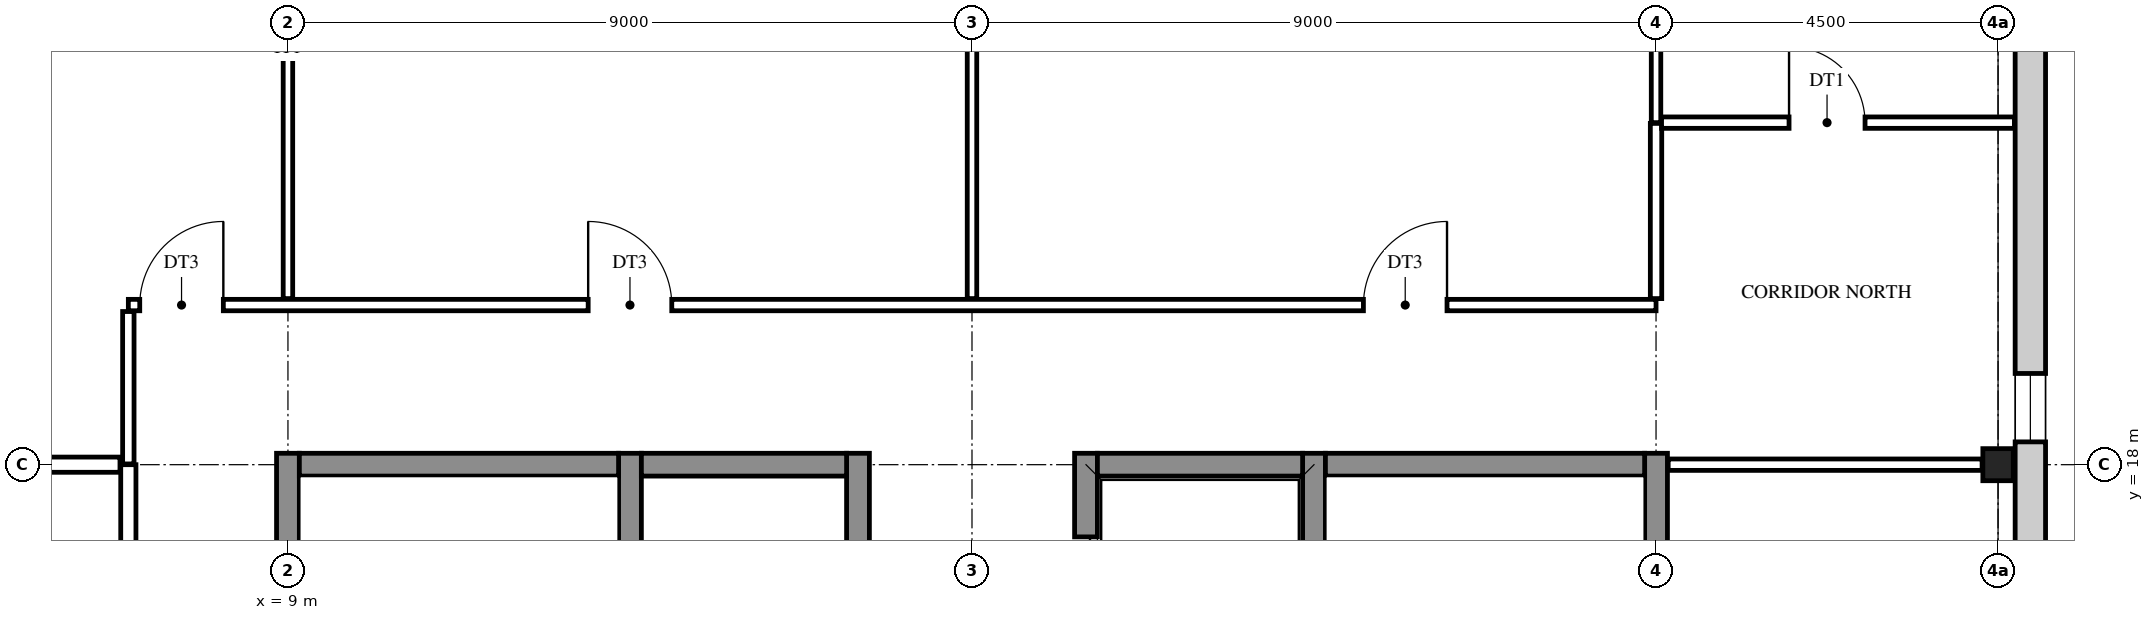
"""IFC4 building model, lengths in metres.
Left out: names, types, materials, properties, quantities, classifications, styles, units other than length and angle.
Written with IfcOpenShell. Run it as: python <this file> out.ifc"""

import sys

from ifc_helpers import new_model, si_unit, direction, frame, frame_2d, origin, origin_2d, place, context, subcontext, project, spatial, rectangle, i_section, extrude, element, fill, save


model = new_model("IFC4")
c1 = context("Model", 3, precision=1e-05, world=origin(), true_north=direction((0.0, 1.0)))
c2 = subcontext(c1, "Body", "Model", "MODEL_VIEW")
j1 = project(units=[si_unit("LENGTHUNIT", "METRE"), si_unit("PLANEANGLEUNIT", "RADIAN")], contexts=[c1])
p1 = place(None, origin())
s1 = spatial("IfcSite", under=j1, at=p1, CompositionType="ELEMENT")
p2 = place(p1, origin())
s2 = spatial("IfcBuilding", under=s1, at=p2, CompositionType="ELEMENT")
p3 = place(p2, frame((0.0, 0.0, 19.2)))
s3 = spatial("IfcBuildingStorey", under=s2, at=p3, CompositionType="ELEMENT", Elevation=19.2)
p4 = place(p3, frame((31.5, 18.0, 0.0), z_axis=(0.0, 0.0, 1.0), x_axis=(1.0, 0.0, 0.0)))
e1 = element("IfcColumn", 1, at=p4, inside=s3, PredefinedType="COLUMN", context=c2, shape_type="SweptSolid", body=[
    extrude(i_section(OverallWidth=0.4, OverallDepth=0.422, WebThickness=0.028, FlangeThickness=0.036, at=origin_2d()), origin(), (0.0, 0.0, 1.0), 4.2),
])
for number, where, z_axis, x_axis in (
    (2, (9.0, 8.85, 0.0), (0.0, 0.0, 1.0), (0.0, 1.0, 0.0)),
    (3, (13.5, 8.85, 0.0), (0.0, 0.0, 1.0), (0.0, 1.0, 0.0)),
):
    element("IfcWall", number, at=place(p3, frame(where, z_axis=z_axis, x_axis=x_axis)), inside=s3, PredefinedType="SHEAR", context=c2, shape_type="SweptSolid", body=[
        extrude(rectangle(XDim=9.3, YDim=0.3, at=frame_2d((4.65, 0.0))), origin(), (0.0, 0.0, 1.0), 4.2),
    ])
p5 = place(p3, frame((16.5, 8.85, 0.0), z_axis=(0.0, 0.0, 1.0), x_axis=(0.0, 1.0, 0.0)))
e4 = element("IfcWall", 4, at=p5, inside=s3, PredefinedType="SHEAR", context=c2, shape_type="SweptSolid", body=[
    extrude(rectangle(XDim=9.3, YDim=0.3, at=frame_2d((4.65, 0.0))), origin(), (0.0, 0.0, 1.0), 4.2),
])
p6 = place(p5, frame((1.1, 0.0, 0.0)))
e5 = element("IfcOpeningElement", 5, at=p6, cuts=e4, PredefinedType="OPENING", context=c2, shape_type="SweptSolid", body=[
    extrude(rectangle(XDim=1.1, YDim=2.1, at=frame_2d((0.55, 1.05))), frame((0.0, 0.16, 0.0), z_axis=(0.0, -1.0, 0.0), x_axis=(1.0, 0.0, 0.0)), (0.0, 0.0, 1.0), 0.32),
])
p7 = place(p5, frame((4.1, 0.0, 0.0)))
e6 = element("IfcOpeningElement", 6, at=p7, cuts=e4, PredefinedType="OPENING", context=c2, shape_type="SweptSolid", body=[
    extrude(rectangle(XDim=1.1, YDim=2.1, at=frame_2d((0.55, 1.05))), frame((0.0, 0.16, 0.0), z_axis=(0.0, -1.0, 0.0), x_axis=(1.0, 0.0, 0.0)), (0.0, 0.0, 1.0), 0.32),
])
p8 = place(p3, frame((19.5, 8.85, 0.0), z_axis=(0.0, 0.0, 1.0), x_axis=(0.0, 1.0, 0.0)))
e7 = element("IfcWall", 7, at=p8, inside=s3, PredefinedType="SHEAR", context=c2, shape_type="SweptSolid", body=[
    extrude(rectangle(XDim=9.3, YDim=0.3, at=frame_2d((4.65, 0.0))), origin(), (0.0, 0.0, 1.0), 4.2),
])
p9 = place(p8, frame((3.95, 0.0, 0.0)))
e8 = element("IfcOpeningElement", 8, at=p9, cuts=e7, PredefinedType="OPENING", context=c2, shape_type="SweptSolid", body=[
    extrude(rectangle(XDim=1.4, YDim=2.1, at=frame_2d((0.7, 1.05))), frame((0.0, 0.16, 0.0), z_axis=(0.0, -1.0, 0.0), x_axis=(1.0, 0.0, 0.0)), (0.0, 0.0, 1.0), 0.32),
])
p10 = place(p8, frame((7.1, 0.0, 0.0)))
e9 = element("IfcOpeningElement", 9, at=p10, cuts=e7, PredefinedType="OPENING", context=c2, shape_type="SweptSolid", body=[
    extrude(rectangle(XDim=1.1, YDim=2.1, at=frame_2d((0.55, 1.05))), frame((0.0, 0.16, 0.0), z_axis=(0.0, -1.0, 0.0), x_axis=(1.0, 0.0, 0.0)), (0.0, 0.0, 1.0), 0.32),
])
for number, where, z_axis, x_axis in (
    (10, (22.5, 8.85, 0.0), (0.0, 0.0, 1.0), (0.0, 1.0, 0.0)),
    (11, (27.0, 8.85, 0.0), (0.0, 0.0, 1.0), (0.0, 1.0, 0.0)),
):
    element("IfcWall", number, at=place(p3, frame(where, z_axis=z_axis, x_axis=x_axis)), inside=s3, PredefinedType="SHEAR", context=c2, shape_type="SweptSolid", body=[
        extrude(rectangle(XDim=9.3, YDim=0.3, at=frame_2d((4.65, 0.0))), origin(), (0.0, 0.0, 1.0), 4.2),
    ])
p11 = place(p3, frame((9.15, 18.0, 0.0), z_axis=(0.0, 0.0, 1.0), x_axis=(1.0, 0.0, 0.0)))
e12 = element("IfcWall", 12, at=p11, inside=s3, PredefinedType="SHEAR", context=c2, shape_type="SweptSolid", body=[
    extrude(rectangle(XDim=4.2, YDim=0.3, at=frame_2d((2.1, 0.0))), origin(), (0.0, 0.0, 1.0), 4.2),
])
for number, where, z_axis, x_axis in (
    (13, (13.65, 18.0, 0.0), (0.0, 0.0, 1.0), (1.0, 0.0, 0.0)),
    (14, (19.65, 18.0, 0.0), (0.0, 0.0, 1.0), (1.0, 0.0, 0.0)),
):
    element("IfcWall", number, at=place(p3, frame(where, z_axis=z_axis, x_axis=x_axis)), inside=s3, PredefinedType="SHEAR", context=c2, shape_type="SweptSolid", body=[
        extrude(rectangle(XDim=2.7, YDim=0.3, at=frame_2d((1.35, 0.0))), origin(), (0.0, 0.0, 1.0), 4.2),
    ])
p12 = place(p3, frame((22.65, 18.0, 0.0), z_axis=(0.0, 0.0, 1.0), x_axis=(1.0, 0.0, 0.0)))
e15 = element("IfcWall", 15, at=p12, inside=s3, PredefinedType="SHEAR", context=c2, shape_type="SweptSolid", body=[
    extrude(rectangle(XDim=4.2, YDim=0.3, at=frame_2d((2.1, 0.0))), origin(), (0.0, 0.0, 1.0), 4.2),
])
p13 = place(p3, frame((31.925, 27.225, 0.0), z_axis=(0.0, 0.0, 1.0), x_axis=(0.0, -1.0, 0.0)))
e16 = element("IfcWall", 16, at=p13, inside=s3, PredefinedType="STANDARD", context=c2, shape_type="SweptSolid", body=[
    extrude(rectangle(XDim=27.45, YDim=0.4, at=frame_2d((13.725, 0.0))), origin(), (0.0, 0.0, 1.0), 4.2),
])
p14 = place(p13, frame((26.025, 0.0, 0.9)))
e17 = element("IfcOpeningElement", 17, at=p14, cuts=e16, PredefinedType="OPENING", context=c2, shape_type="SweptSolid", body=[
    extrude(rectangle(XDim=0.9, YDim=2.0, at=frame_2d((0.45, 1.0))), frame((0.0, 0.21, 0.0), z_axis=(0.0, -1.0, 0.0), x_axis=(1.0, 0.0, 0.0)), (0.0, 0.0, 1.0), 0.42),
])
p15 = place(p13, frame((18.525, 0.0, 0.9)))
e18 = element("IfcOpeningElement", 18, at=p15, cuts=e16, PredefinedType="OPENING", context=c2, shape_type="SweptSolid", body=[
    extrude(rectangle(XDim=0.9, YDim=2.0, at=frame_2d((0.45, 1.0))), frame((0.0, 0.21, 0.0), z_axis=(0.0, -1.0, 0.0), x_axis=(1.0, 0.0, 0.0)), (0.0, 0.0, 1.0), 0.42),
])
p16 = place(p13, frame((15.675, 0.0, 1.6)))
e19 = element("IfcOpeningElement", 19, at=p16, cuts=e16, PredefinedType="OPENING", context=c2, shape_type="SweptSolid", body=[
    extrude(rectangle(XDim=0.6, YDim=0.9, at=frame_2d((0.3, 0.45))), frame((0.0, 0.21, 0.0), z_axis=(0.0, -1.0, 0.0), x_axis=(1.0, 0.0, 0.0)), (0.0, 0.0, 1.0), 0.42),
])
p17 = place(p13, frame((11.175, 0.0, 1.6)))
e20 = element("IfcOpeningElement", 20, at=p17, cuts=e16, PredefinedType="OPENING", context=c2, shape_type="SweptSolid", body=[
    extrude(rectangle(XDim=0.6, YDim=0.9, at=frame_2d((0.3, 0.45))), frame((0.0, 0.21, 0.0), z_axis=(0.0, -1.0, 0.0), x_axis=(1.0, 0.0, 0.0)), (0.0, 0.0, 1.0), 0.42),
])
p18 = place(p13, frame((8.025, 0.0, 0.9)))
e21 = element("IfcOpeningElement", 21, at=p18, cuts=e16, PredefinedType="OPENING", context=c2, shape_type="SweptSolid", body=[
    extrude(rectangle(XDim=0.9, YDim=2.0, at=frame_2d((0.45, 1.0))), frame((0.0, 0.21, 0.0), z_axis=(0.0, -1.0, 0.0), x_axis=(1.0, 0.0, 0.0)), (0.0, 0.0, 1.0), 0.42),
])
p19 = place(p13, frame((0.525, 0.0, 0.9)))
e22 = element("IfcOpeningElement", 22, at=p19, cuts=e16, PredefinedType="OPENING", context=c2, shape_type="SweptSolid", body=[
    extrude(rectangle(XDim=0.9, YDim=2.0, at=frame_2d((0.45, 1.0))), frame((0.0, 0.21, 0.0), z_axis=(0.0, -1.0, 0.0), x_axis=(1.0, 0.0, 0.0)), (0.0, 0.0, 1.0), 0.42),
])
p20 = place(p3, frame((6.9, 9.0, 0.0), z_axis=(0.0, 0.0, 1.0), x_axis=(0.0, 1.0, 0.0)))
e23 = element("IfcWall", 23, at=p20, inside=s3, PredefinedType="PARTITIONING", context=c2, shape_type="SweptSolid", body=[
    extrude(rectangle(XDim=9.0, YDim=0.2, at=frame_2d((4.5, 0.0))), origin(), (0.0, 0.0, 1.0), 3.537),
])
p21 = place(p20, frame((1.75, 0.0, 0.0)))
e24 = element("IfcOpeningElement", 24, at=p21, cuts=e23, PredefinedType="OPENING", context=c2, shape_type="SweptSolid", body=[
    extrude(rectangle(XDim=1.0, YDim=2.1, at=frame_2d((0.5, 1.05))), frame((0.0, 0.11, 0.0), z_axis=(0.0, -1.0, 0.0), x_axis=(1.0, 0.0, 0.0)), (0.0, 0.0, 1.0), 0.22),
])
p22 = place(p20, frame((6.25, 0.0, 0.0)))
e25 = element("IfcOpeningElement", 25, at=p22, cuts=e23, PredefinedType="OPENING", context=c2, shape_type="SweptSolid", body=[
    extrude(rectangle(XDim=1.0, YDim=2.1, at=frame_2d((0.5, 1.05))), frame((0.0, 0.11, 0.0), z_axis=(0.0, -1.0, 0.0), x_axis=(1.0, 0.0, 0.0)), (0.0, 0.0, 1.0), 0.22),
])
p23 = place(p3, frame((6.9, 18.01, 0.0), z_axis=(0.0, 0.0, 1.0), x_axis=(0.0, 1.0, 0.0)))
e26 = element("IfcWall", 26, at=p23, inside=s3, PredefinedType="PARTITIONING", context=c2, shape_type="SweptSolid", body=[
    extrude(rectangle(XDim=2.005, YDim=0.15, at=frame_2d((1.002, 0.0))), origin(), (0.0, 0.0, 1.0), 3.537),
])
for number, where, z_axis, x_axis in (
    (27, (9.0, 20.185, 0.0), (0.0, 0.0, 1.0), (0.0, 1.0, 0.0)),
    (28, (18.0, 20.185, 0.0), (0.0, 0.0, 1.0), (0.0, 1.0, 0.0)),
):
    element("IfcWall", number, at=place(p3, frame(where, z_axis=z_axis, x_axis=x_axis)), inside=s3, PredefinedType="PARTITIONING", context=c2, shape_type="SweptSolid", body=[
        extrude(rectangle(XDim=6.594, YDim=0.125, at=frame_2d((3.297, 0.0))), origin(), (0.0, 0.0, 1.0), 3.537),
    ])
p24 = place(p3, frame((27.0, 20.185, 0.0), z_axis=(0.0, 0.0, 1.0), x_axis=(0.0, 1.0, 0.0)))
e29 = element("IfcWall", 29, at=p24, inside=s3, PredefinedType="PARTITIONING", context=c2, shape_type="SweptSolid", body=[
    extrude(rectangle(XDim=2.305, YDim=0.15, at=frame_2d((1.152, 0.0))), origin(), (0.0, 0.0, 1.0), 3.537),
])
p25 = place(p3, frame((27.0, 22.5, 0.0), z_axis=(0.0, 0.0, 1.0), x_axis=(0.0, 1.0, 0.0)))
e30 = element("IfcWall", 30, at=p25, inside=s3, PredefinedType="PARTITIONING", context=c2, shape_type="SweptSolid", body=[
    extrude(rectangle(XDim=4.279, YDim=0.125, at=frame_2d((2.14, 0.0))), origin(), (0.0, 0.0, 1.0), 3.537),
])
p26 = place(p3, frame((0.21, 18.0, 0.0), z_axis=(0.0, 0.0, 1.0), x_axis=(1.0, 0.0, 0.0)))
e31 = element("IfcWall", 31, at=p26, inside=s3, PredefinedType="PARTITIONING", context=c2, shape_type="SweptSolid", body=[
    extrude(rectangle(XDim=6.58, YDim=0.2, at=frame_2d((3.29, 0.0))), origin(), (0.0, 0.0, 1.0), 3.537),
])
p27 = place(p3, frame((27.16, 18.0, 0.0), z_axis=(0.0, 0.0, 1.0), x_axis=(1.0, 0.0, 0.0)))
e32 = element("IfcWall", 32, at=p27, inside=s3, PredefinedType="PARTITIONING", context=c2, shape_type="SweptSolid", body=[
    extrude(rectangle(XDim=4.13, YDim=0.15, at=frame_2d((2.065, 0.0))), origin(), (0.0, 0.0, 1.0), 3.537),
])
p28 = place(p3, frame((6.9, 20.1, 0.0), z_axis=(0.0, 0.0, 1.0), x_axis=(1.0, 0.0, 0.0)))
e33 = element("IfcWall", 33, at=p28, inside=s3, PredefinedType="PARTITIONING", context=c2, shape_type="SweptSolid", body=[
    extrude(rectangle(XDim=20.1, YDim=0.15, at=frame_2d((10.05, 0.0))), origin(), (0.0, 0.0, 1.0), 3.537),
])
p29 = place(p28, frame((0.15, 0.0, 0.0)))
e34 = element("IfcOpeningElement", 34, at=p29, cuts=e33, PredefinedType="OPENING", context=c2, shape_type="SweptSolid", body=[
    extrude(rectangle(XDim=1.1, YDim=2.1, at=frame_2d((0.55, 1.05))), frame((0.0, 0.085, 0.0), z_axis=(0.0, -1.0, 0.0), x_axis=(1.0, 0.0, 0.0)), (0.0, 0.0, 1.0), 0.17),
])
p30 = place(p28, frame((6.05, 0.0, 0.0)))
e35 = element("IfcOpeningElement", 35, at=p30, cuts=e33, PredefinedType="OPENING", context=c2, shape_type="SweptSolid", body=[
    extrude(rectangle(XDim=1.1, YDim=2.1, at=frame_2d((0.55, 1.05))), frame((0.0, 0.085, 0.0), z_axis=(0.0, -1.0, 0.0), x_axis=(1.0, 0.0, 0.0)), (0.0, 0.0, 1.0), 0.17),
])
p31 = place(p28, frame((16.25, 0.0, 0.0)))
e36 = element("IfcOpeningElement", 36, at=p31, cuts=e33, PredefinedType="OPENING", context=c2, shape_type="SweptSolid", body=[
    extrude(rectangle(XDim=1.1, YDim=2.1, at=frame_2d((0.55, 1.05))), frame((0.0, 0.085, 0.0), z_axis=(0.0, -1.0, 0.0), x_axis=(1.0, 0.0, 0.0)), (0.0, 0.0, 1.0), 0.17),
])
p32 = place(p3, frame((27.073, 22.5, 0.0), z_axis=(0.0, 0.0, 1.0), x_axis=(1.0, 0.0, 0.0)))
e37 = element("IfcWall", 37, at=p32, inside=s3, PredefinedType="PARTITIONING", context=c2, shape_type="SweptSolid", body=[
    extrude(rectangle(XDim=4.643, YDim=0.15, at=frame_2d((2.321, 0.0))), origin(), (0.0, 0.0, 1.0), 3.537),
])
p33 = place(p32, frame((1.677, 0.0, 0.0)))
e38 = element("IfcOpeningElement", 38, at=p33, cuts=e37, PredefinedType="OPENING", context=c2, shape_type="SweptSolid", body=[
    extrude(rectangle(XDim=1.0, YDim=2.1, at=frame_2d((0.5, 1.05))), frame((0.0, 0.085, 0.0), z_axis=(0.0, -1.0, 0.0), x_axis=(1.0, 0.0, 0.0)), (0.0, 0.0, 1.0), 0.17),
])
p34 = place(p18, origin())
e39 = element("IfcWindow", 39, at=p34, inside=s3, PartitioningType="SINGLE_PANEL", PredefinedType="WINDOW", context=c2, shape_type="SweptSolid", body=[
    extrude(rectangle(XDim=0.9, YDim=2.0, at=frame_2d((0.45, 1.0))), frame((0.0, 0.03, 0.0), z_axis=(0.0, -1.0, 0.0), x_axis=(1.0, 0.0, 0.0)), (0.0, 0.0, 1.0), 0.06),
])
fill(e21, e39)
p35 = place(p29, origin())
e40 = element("IfcDoor", 40, at=p35, inside=s3, OperationType="SINGLE_SWING_RIGHT", PredefinedType="DOOR", context=c2, shape_type="SweptSolid", body=[
    extrude(rectangle(XDim=1.1, YDim=2.1, at=frame_2d((0.55, 1.05))), frame((0.0, 0.025, 0.0), z_axis=(0.0, -1.0, 0.0), x_axis=(1.0, 0.0, 0.0)), (0.0, 0.0, 1.0), 0.05),
])
fill(e34, e40)
p36 = place(p30, origin())
e41 = element("IfcDoor", 41, at=p36, inside=s3, OperationType="SINGLE_SWING_LEFT", PredefinedType="DOOR", context=c2, shape_type="SweptSolid", body=[
    extrude(rectangle(XDim=1.1, YDim=2.1, at=frame_2d((0.55, 1.05))), frame((0.0, 0.025, 0.0), z_axis=(0.0, -1.0, 0.0), x_axis=(1.0, 0.0, 0.0)), (0.0, 0.0, 1.0), 0.05),
])
fill(e35, e41)
p37 = place(p31, origin())
e42 = element("IfcDoor", 42, at=p37, inside=s3, OperationType="SINGLE_SWING_RIGHT", PredefinedType="DOOR", context=c2, shape_type="SweptSolid", body=[
    extrude(rectangle(XDim=1.1, YDim=2.1, at=frame_2d((0.55, 1.05))), frame((0.0, 0.025, 0.0), z_axis=(0.0, -1.0, 0.0), x_axis=(1.0, 0.0, 0.0)), (0.0, 0.0, 1.0), 0.05),
])
fill(e36, e42)
p38 = place(p33, origin())
e43 = element("IfcDoor", 43, at=p38, inside=s3, OperationType="SINGLE_SWING_LEFT", PredefinedType="DOOR", context=c2, shape_type="SweptSolid", body=[
    extrude(rectangle(XDim=1.0, YDim=2.1, at=frame_2d((0.5, 1.05))), frame((0.0, 0.025, 0.0), z_axis=(0.0, -1.0, 0.0), x_axis=(1.0, 0.0, 0.0)), (0.0, 0.0, 1.0), 0.05),
])
fill(e38, e43)
p39 = place(p10, origin())
e44 = element("IfcDoor", 44, at=p39, inside=s3, OperationType="DOUBLE_DOOR_SLIDING", PredefinedType="DOOR", context=c2, shape_type="SweptSolid", body=[
    extrude(rectangle(XDim=1.1, YDim=2.1, at=frame_2d((0.55, 1.05))), frame((0.0, 0.025, 0.0), z_axis=(0.0, -1.0, 0.0), x_axis=(1.0, 0.0, 0.0)), (0.0, 0.0, 1.0), 0.05),
])
fill(e9, e44)
save(model, sys.argv[1])
